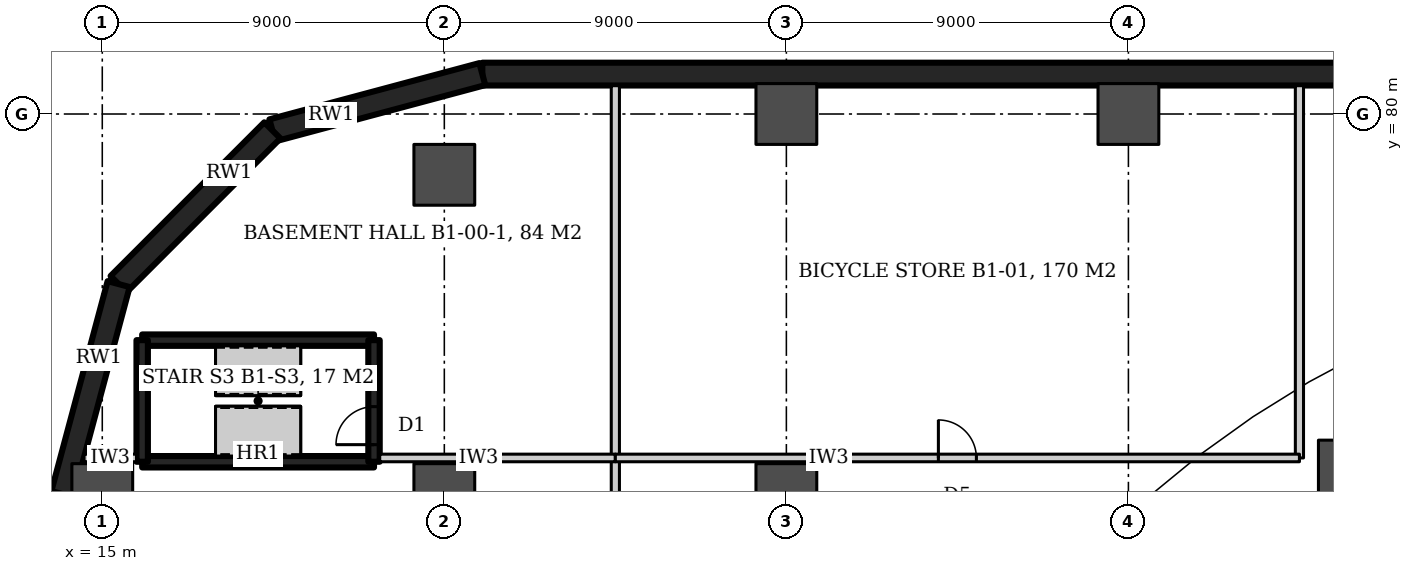
"""IFC4 building model, lengths in metres.
Left out: names, types, materials, properties, quantities, classifications, styles, units other than length and angle.
Written with IfcOpenShell. Run it as: python <this file> out.ifc"""

import sys

from ifc_helpers import new_model, si_unit, direction, frame, frame_2d, origin, origin_2d, place, context, subcontext, project, spatial, rectangle, circle, extrude, element, fill, save


model = new_model("IFC4")
c1 = context("Model", 3, precision=1e-05, world=origin(), true_north=direction((0.0, 1.0)))
c2 = subcontext(c1, "Body", "Model", "MODEL_VIEW")
j1 = project(units=[si_unit("LENGTHUNIT", "METRE"), si_unit("PLANEANGLEUNIT", "RADIAN")], contexts=[c1])
p1 = place(None, origin())
s1 = spatial("IfcSite", under=j1, at=p1, CompositionType="ELEMENT")
p2 = place(p1, origin())
s2 = spatial("IfcBuilding", under=s1, at=p2, CompositionType="ELEMENT")
p3 = place(p2, frame((0.0, 0.0, -6.0)))
s3 = spatial("IfcBuildingStorey", under=s2, at=p3, CompositionType="ELEMENT", Elevation=-6.0)
p4 = place(p3, frame((95.0, 81.05, -0.5), z_axis=(0.0, 0.0, 1.0), x_axis=(-1.0, 0.0, 0.0)))
e1 = element("IfcWall", 1, at=p4, inside=s3, PredefinedType="SOLIDWALL", context=c2, shape_type="SweptSolid", body=[
    extrude(rectangle(XDim=70.0, YDim=0.6, at=frame_2d((35.0, 0.0))), origin(), (0.0, 0.0, 1.0), 6.2),
])
p5 = place(p3, frame((25.0, 81.05, -0.5), z_axis=(0.0, 0.0, 1.0), x_axis=(-0.965922520654, -0.258831381584, 0.0)))
e2 = element("IfcWall", 2, at=p5, inside=s3, PredefinedType="SOLIDWALL", context=c2, shape_type="SweptSolid", body=[
    extrude(rectangle(XDim=5.72, YDim=0.6, at=frame_2d((2.86, 0.0))), origin(), (0.0, 0.0, 1.0), 6.2),
])
p6 = place(p3, frame((19.475, 79.57, -0.5), z_axis=(0.0, 0.0, 1.0), x_axis=(-0.707106781187, -0.707106781187, 0.0)))
e3 = element("IfcWall", 3, at=p6, inside=s3, PredefinedType="SOLIDWALL", context=c2, shape_type="SweptSolid", body=[
    extrude(rectangle(XDim=5.72, YDim=0.6, at=frame_2d((2.86, 0.0))), origin(), (0.0, 0.0, 1.0), 6.2),
])
p7 = place(p3, frame((15.43, 75.525, -0.5), z_axis=(0.0, 0.0, 1.0), x_axis=(-0.258831381584, -0.965922520654, 0.0)))
e4 = element("IfcWall", 4, at=p7, inside=s3, PredefinedType="SOLIDWALL", context=c2, shape_type="SweptSolid", body=[
    extrude(rectangle(XDim=5.72, YDim=0.6, at=frame_2d((2.86, 0.0))), origin(), (0.0, 0.0, 1.0), 6.2),
])
for number, where, z_axis, x_axis in (
    (5, (15.0, 70.0, -0.5), (0.0, 0.0, 1.0), (1.0, 0.0, 0.0)),
    (6, (24.0, 70.0, -0.5), (0.0, 0.0, 1.0), (1.0, 0.0, 0.0)),
    (7, (33.0, 70.0, -0.5), (0.0, 0.0, 1.0), (1.0, 0.0, 0.0)),
    (8, (24.0, 78.4, -0.5), (0.0, 0.0, 1.0), (1.0, 0.0, 0.0)),
    (9, (33.0, 80.0, -0.5), (0.0, 0.0, 1.0), (1.0, 0.0, 0.0)),
    (10, (42.0, 80.0, -0.5), (0.0, 0.0, 1.0), (1.0, 0.0, 0.0)),
):
    element("IfcColumn", number, at=place(p3, frame(where, z_axis=z_axis, x_axis=x_axis)), inside=s3, PredefinedType="COLUMN", context=c2, shape_type="SweptSolid", body=[
        extrude(rectangle(XDim=1.6, YDim=1.6, at=origin_2d()), origin(), (0.0, 0.0, 1.0), 6.5),
    ])
p8 = place(p3, frame((48.5, 69.919, 0.0), z_axis=(0.0, 0.0, 1.0), x_axis=(1.0, 0.0, 0.0)))
e11 = element("IfcColumn", 11, at=p8, inside=s3, PredefinedType="COLUMN", context=c2, shape_type="SweptSolid", body=[
    extrude(circle(Radius=1.5, at=origin_2d()), origin(), (0.0, 0.0, 1.0), 6.0),
])
p9 = place(p3, frame((28.5, 31.0, 0.0), z_axis=(0.0, 0.0, 1.0), x_axis=(0.0, 1.0, 0.0)))
e12 = element("IfcWall", 12, at=p9, inside=s3, PredefinedType="PARTITIONING", context=c2, shape_type="SweptSolid", body=[
    extrude(rectangle(XDim=39.95, YDim=0.215, at=frame_2d((19.975, 0.0))), origin(), (0.0, 0.0, 1.0), 3.68),
])
p10 = place(p9, frame((18.975, 0.0, 0.0)))
e13 = element("IfcOpeningElement", 13, at=p10, cuts=e12, PredefinedType="OPENING", context=c2, shape_type="SweptSolid", body=[
    extrude(rectangle(XDim=2.0, YDim=2.4, at=frame_2d((1.0, 1.2))), frame((0.0, 0.117, 0.0), z_axis=(0.0, -1.0, 0.0), x_axis=(1.0, 0.0, 0.0)), (0.0, 0.0, 1.0), 0.235),
])
for number, where, z_axis, x_axis in (
    (14, (28.5, 70.95, 0.0), (0.0, 0.0, 1.0), (0.0, 1.0, 0.0)),
    (15, (46.5, 70.95, 0.0), (0.0, 0.0, 1.0), (0.0, 1.0, 0.0)),
):
    element("IfcWall", number, at=place(p3, frame(where, z_axis=z_axis, x_axis=x_axis)), inside=s3, PredefinedType="PARTITIONING", context=c2, shape_type="SweptSolid", body=[
        extrude(rectangle(XDim=9.795, YDim=0.215, at=frame_2d((4.897, 0.0))), origin(), (0.0, 0.0, 1.0), 3.68),
    ])
p11 = place(p3, frame((14.52, 70.95, 0.0), z_axis=(0.0, 0.0, 1.0), x_axis=(1.0, 0.0, 0.0)))
e16 = element("IfcWall", 16, at=p11, inside=s3, PredefinedType="PARTITIONING", context=c2, shape_type="SweptSolid", body=[
    extrude(rectangle(XDim=1.38, YDim=0.2, at=frame_2d((0.69, 0.0))), origin(), (0.0, 0.0, 1.0), 4.1),
])
p12 = place(p3, frame((22.3, 70.95, 0.0), z_axis=(0.0, 0.0, 1.0), x_axis=(1.0, 0.0, 0.0)))
e17 = element("IfcWall", 17, at=p12, inside=s3, PredefinedType="PARTITIONING", context=c2, shape_type="SweptSolid", body=[
    extrude(rectangle(XDim=6.2, YDim=0.2, at=frame_2d((3.1, 0.0))), origin(), (0.0, 0.0, 1.0), 4.1),
])
p13 = place(p3, frame((28.5, 70.95, 0.0), z_axis=(0.0, 0.0, 1.0), x_axis=(1.0, 0.0, 0.0)))
e18 = element("IfcWall", 18, at=p13, inside=s3, PredefinedType="PARTITIONING", context=c2, shape_type="SweptSolid", body=[
    extrude(rectangle(XDim=18.0, YDim=0.2, at=frame_2d((9.0, 0.0))), origin(), (0.0, 0.0, 1.0), 3.68),
])
p14 = place(p13, frame((8.5, 0.0, 0.0)))
e19 = element("IfcOpeningElement", 19, at=p14, cuts=e18, PredefinedType="OPENING", context=c2, shape_type="SweptSolid", body=[
    extrude(rectangle(XDim=1.0, YDim=2.1, at=frame_2d((0.5, 1.05))), frame((0.0, 0.11, 0.0), z_axis=(0.0, -1.0, 0.0), x_axis=(1.0, 0.0, 0.0)), (0.0, 0.0, 1.0), 0.22),
])
for number, where, z_axis, x_axis in (
    (20, (16.05, 70.85, 0.0), (0.0, 0.0, 1.0), (1.0, 0.0, 0.0)),
    (21, (16.05, 74.05, 0.0), (0.0, 0.0, 1.0), (1.0, 0.0, 0.0)),
):
    element("IfcWall", number, at=place(p3, frame(where, z_axis=z_axis, x_axis=x_axis)), inside=s3, PredefinedType="SHEAR", context=c2, shape_type="SweptSolid", body=[
        extrude(rectangle(XDim=6.1, YDim=0.3, at=frame_2d((3.05, 0.0))), origin(), (0.0, 0.0, 1.0), 6.0),
    ])
p15 = place(p3, frame((16.05, 70.85, 0.0), z_axis=(0.0, 0.0, 1.0), x_axis=(0.0, 1.0, 0.0)))
e22 = element("IfcWall", 22, at=p15, inside=s3, PredefinedType="SHEAR", context=c2, shape_type="SweptSolid", body=[
    extrude(rectangle(XDim=3.2, YDim=0.3, at=frame_2d((1.6, 0.0))), origin(), (0.0, 0.0, 1.0), 6.0),
])
p16 = place(p3, frame((22.15, 70.85, 0.0), z_axis=(0.0, 0.0, 1.0), x_axis=(0.0, 1.0, 0.0)))
e23 = element("IfcWall", 23, at=p16, inside=s3, PredefinedType="SHEAR", context=c2, shape_type="SweptSolid", body=[
    extrude(rectangle(XDim=3.2, YDim=0.3, at=frame_2d((1.6, 0.0))), origin(), (0.0, 0.0, 1.0), 6.0),
])
p17 = place(p16, frame((0.45, 0.0, 0.0)))
e24 = element("IfcOpeningElement", 24, at=p17, cuts=e23, PredefinedType="OPENING", context=c2, shape_type="SweptSolid", body=[
    extrude(rectangle(XDim=1.0, YDim=2.1, at=frame_2d((0.5, 1.05))), frame((0.0, 0.16, 0.0), z_axis=(0.0, -1.0, 0.0), x_axis=(1.0, 0.0, 0.0)), (0.0, 0.0, 1.0), 0.32),
])
p18 = place(p14, origin())
e25 = element("IfcDoor", 25, at=p18, inside=s3, OperationType="SINGLE_SWING_LEFT", PredefinedType="DOOR", context=c2, shape_type="SweptSolid", body=[
    extrude(rectangle(XDim=1.0, YDim=2.1, at=frame_2d((0.5, 1.05))), frame((0.0, 0.025, 0.0), z_axis=(0.0, -1.0, 0.0), x_axis=(1.0, 0.0, 0.0)), (0.0, 0.0, 1.0), 0.05),
])
fill(e19, e25)
p19 = place(p17, origin())
e26 = element("IfcDoor", 26, at=p19, inside=s3, OperationType="SINGLE_SWING_LEFT", PredefinedType="DOOR", context=c2, shape_type="SweptSolid", body=[
    extrude(rectangle(XDim=1.0, YDim=2.1, at=frame_2d((0.5, 1.05))), frame((0.0, 0.025, 0.0), z_axis=(0.0, -1.0, 0.0), x_axis=(1.0, 0.0, 0.0)), (0.0, 0.0, 1.0), 0.05),
])
fill(e24, e26)
save(model, sys.argv[1])
